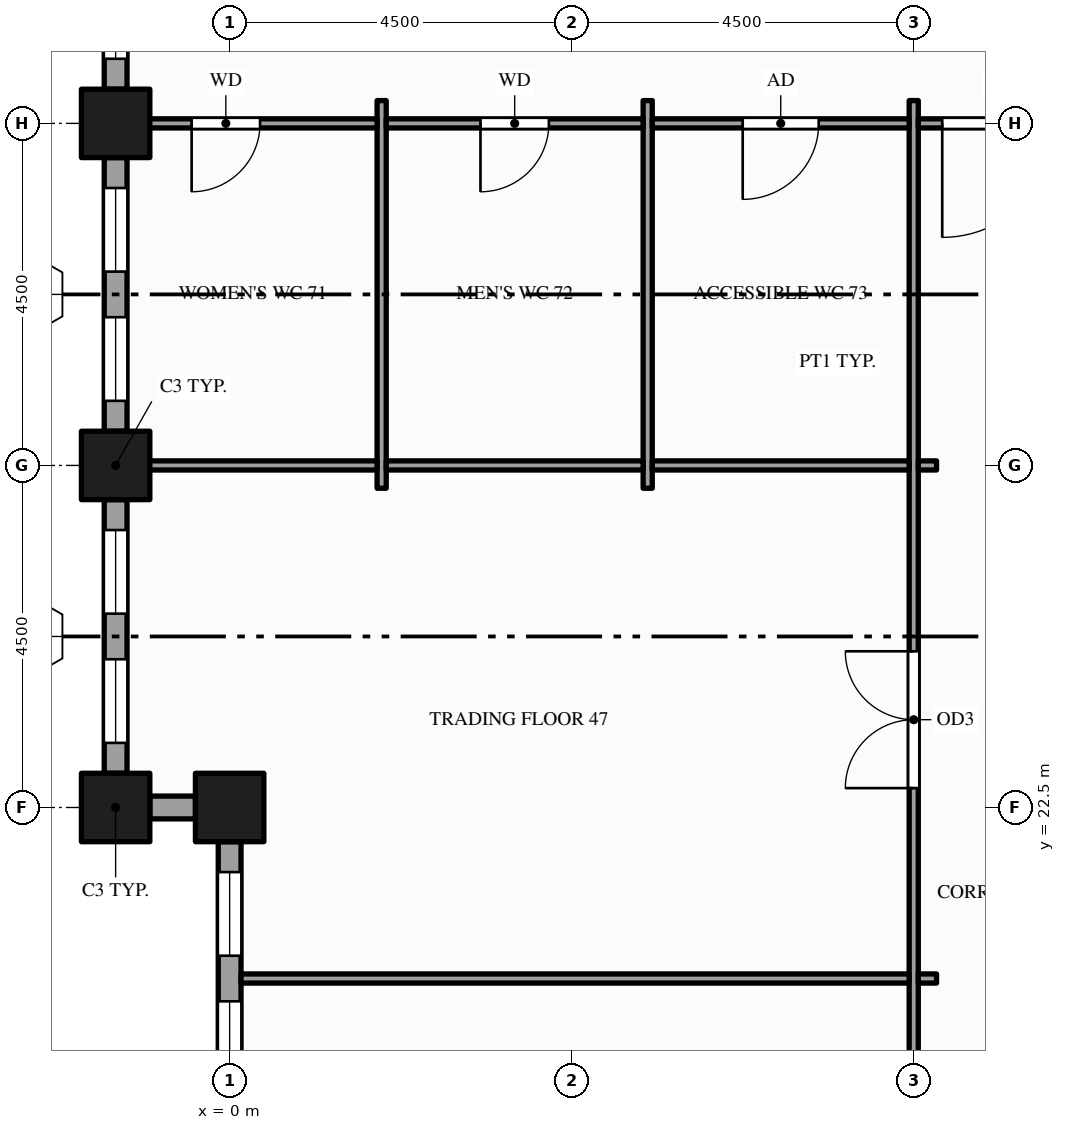
"""IFC4 building model, lengths in metres.
Left out: names, types, materials, properties, quantities, classifications, styles, units other than length and angle.
Written with IfcOpenShell. Run it as: python <this file> out.ifc"""

import sys

from ifc_helpers import new_model, si_unit, direction, frame, frame_2d, origin, origin_2d, place, context, subcontext, project, spatial, rectangle, hollow_rectangle, extrude, element, fill, save


model = new_model("IFC4")
c1 = context("Model", 3, precision=1e-05, world=origin(), true_north=direction((0.0, 1.0)))
c2 = subcontext(c1, "Body", "Model", "MODEL_VIEW")
j1 = project(units=[si_unit("LENGTHUNIT", "METRE"), si_unit("PLANEANGLEUNIT", "RADIAN")], contexts=[c1])
p1 = place(None, origin())
s1 = spatial("IfcSite", under=j1, at=p1, CompositionType="ELEMENT")
p2 = place(p1, origin())
s2 = spatial("IfcBuilding", under=s1, at=p2, CompositionType="ELEMENT")
p3 = place(p2, frame((0.0, 0.0, 159.0)))
s3 = spatial("IfcBuildingStorey", under=s2, at=p3, CompositionType="ELEMENT", Elevation=159.0)
for number, where, z_axis, x_axis in (
    (1, (-1.5, 22.5, -0.15), (0.0, 0.0, 1.0), (1.0, 0.0, 0.0)),
    (2, (-1.5, 27.0, -0.15), (0.0, 0.0, 1.0), (1.0, 0.0, 0.0)),
    (3, (-1.5, 31.5, -0.15), (0.0, 0.0, 1.0), (1.0, 0.0, 0.0)),
    (4, (0.0, 22.5, -0.15), (0.0, 0.0, 1.0), (1.0, 0.0, 0.0)),
):
    element("IfcColumn", number, at=place(p3, frame(where, z_axis=z_axis, x_axis=x_axis)), inside=s3, PredefinedType="COLUMN", context=c2, shape_type="SweptSolid", body=[
        extrude(hollow_rectangle(XDim=0.9, YDim=0.9, WallThickness=0.045, at=origin_2d()), origin(), (0.0, 0.0, 1.0), 4.0),
    ])
p4 = place(p3, frame((-1.5, 35.55, 0.0), z_axis=(0.0, 0.0, 1.0), x_axis=(0.0, -1.0, 0.0)))
e5 = element("IfcWall", 5, at=p4, inside=s3, PredefinedType="STANDARD", context=c2, shape_type="SweptSolid", body=[
    extrude(rectangle(XDim=3.6, YDim=0.3, at=frame_2d((1.8, 0.0))), origin(), (0.0, 0.0, 1.0), 3.149),
])
p5 = place(p4, frame((0.4, 0.0, 0.9)))
e6 = element("IfcOpeningElement", 6, at=p5, cuts=e5, PredefinedType="OPENING", context=c2, shape_type="SweptSolid", body=[
    extrude(rectangle(XDim=1.1, YDim=2.0, at=frame_2d((0.55, 1.0))), frame((0.0, 0.16, 0.0), z_axis=(0.0, -1.0, 0.0), x_axis=(1.0, 0.0, 0.0)), (0.0, 0.0, 1.0), 0.32),
])
p6 = place(p4, frame((2.1, 0.0, 0.9)))
e7 = element("IfcOpeningElement", 7, at=p6, cuts=e5, PredefinedType="OPENING", context=c2, shape_type="SweptSolid", body=[
    extrude(rectangle(XDim=1.1, YDim=2.0, at=frame_2d((0.55, 1.0))), frame((0.0, 0.16, 0.0), z_axis=(0.0, -1.0, 0.0), x_axis=(1.0, 0.0, 0.0)), (0.0, 0.0, 1.0), 0.32),
])
p7 = place(p3, frame((-1.5, 31.05, 0.0), z_axis=(0.0, 0.0, 1.0), x_axis=(0.0, -1.0, 0.0)))
e8 = element("IfcWall", 8, at=p7, inside=s3, PredefinedType="STANDARD", context=c2, shape_type="SweptSolid", body=[
    extrude(rectangle(XDim=3.6, YDim=0.3, at=frame_2d((1.8, 0.0))), origin(), (0.0, 0.0, 1.0), 3.149),
])
p8 = place(p7, frame((0.4, 0.0, 0.9)))
e9 = element("IfcOpeningElement", 9, at=p8, cuts=e8, PredefinedType="OPENING", context=c2, shape_type="SweptSolid", body=[
    extrude(rectangle(XDim=1.1, YDim=2.0, at=frame_2d((0.55, 1.0))), frame((0.0, 0.16, 0.0), z_axis=(0.0, -1.0, 0.0), x_axis=(1.0, 0.0, 0.0)), (0.0, 0.0, 1.0), 0.32),
])
p9 = place(p7, frame((2.1, 0.0, 0.9)))
e10 = element("IfcOpeningElement", 10, at=p9, cuts=e8, PredefinedType="OPENING", context=c2, shape_type="SweptSolid", body=[
    extrude(rectangle(XDim=1.1, YDim=2.0, at=frame_2d((0.55, 1.0))), frame((0.0, 0.16, 0.0), z_axis=(0.0, -1.0, 0.0), x_axis=(1.0, 0.0, 0.0)), (0.0, 0.0, 1.0), 0.32),
])
p10 = place(p3, frame((-1.5, 26.55, 0.0), z_axis=(0.0, 0.0, 1.0), x_axis=(0.0, -1.0, 0.0)))
e11 = element("IfcWall", 11, at=p10, inside=s3, PredefinedType="STANDARD", context=c2, shape_type="SweptSolid", body=[
    extrude(rectangle(XDim=3.6, YDim=0.3, at=frame_2d((1.8, 0.0))), origin(), (0.0, 0.0, 1.0), 3.149),
])
p11 = place(p10, frame((0.4, 0.0, 0.9)))
e12 = element("IfcOpeningElement", 12, at=p11, cuts=e11, PredefinedType="OPENING", context=c2, shape_type="SweptSolid", body=[
    extrude(rectangle(XDim=1.1, YDim=2.0, at=frame_2d((0.55, 1.0))), frame((0.0, 0.16, 0.0), z_axis=(0.0, -1.0, 0.0), x_axis=(1.0, 0.0, 0.0)), (0.0, 0.0, 1.0), 0.32),
])
p12 = place(p10, frame((2.1, 0.0, 0.9)))
e13 = element("IfcOpeningElement", 13, at=p12, cuts=e11, PredefinedType="OPENING", context=c2, shape_type="SweptSolid", body=[
    extrude(rectangle(XDim=1.1, YDim=2.0, at=frame_2d((0.55, 1.0))), frame((0.0, 0.16, 0.0), z_axis=(0.0, -1.0, 0.0), x_axis=(1.0, 0.0, 0.0)), (0.0, 0.0, 1.0), 0.32),
])
p13 = place(p3, frame((-1.05, 22.5, 0.0), z_axis=(0.0, 0.0, 1.0), x_axis=(1.0, 0.0, 0.0)))
e14 = element("IfcWall", 14, at=p13, inside=s3, PredefinedType="STANDARD", context=c2, shape_type="SweptSolid", body=[
    extrude(rectangle(XDim=0.6, YDim=0.3, at=frame_2d((0.3, 0.0))), origin(), (0.0, 0.0, 1.0), 3.149),
])
p14 = place(p3, frame((0.0, 22.05, 0.0), z_axis=(0.0, 0.0, 1.0), x_axis=(0.0, -1.0, 0.0)))
e15 = element("IfcWall", 15, at=p14, inside=s3, PredefinedType="STANDARD", context=c2, shape_type="SweptSolid", body=[
    extrude(rectangle(XDim=3.6, YDim=0.3, at=frame_2d((1.8, 0.0))), origin(), (0.0, 0.0, 1.0), 3.149),
])
p15 = place(p14, frame((0.4, 0.0, 0.9)))
e16 = element("IfcOpeningElement", 16, at=p15, cuts=e15, PredefinedType="OPENING", context=c2, shape_type="SweptSolid", body=[
    extrude(rectangle(XDim=1.1, YDim=2.0, at=frame_2d((0.55, 1.0))), frame((0.0, 0.16, 0.0), z_axis=(0.0, -1.0, 0.0), x_axis=(1.0, 0.0, 0.0)), (0.0, 0.0, 1.0), 0.32),
])
p16 = place(p14, frame((2.1, 0.0, 0.9)))
e17 = element("IfcOpeningElement", 17, at=p16, cuts=e15, PredefinedType="OPENING", context=c2, shape_type="SweptSolid", body=[
    extrude(rectangle(XDim=1.1, YDim=2.0, at=frame_2d((0.55, 1.0))), frame((0.0, 0.16, 0.0), z_axis=(0.0, -1.0, 0.0), x_axis=(1.0, 0.0, 0.0)), (0.0, 0.0, 1.0), 0.32),
])
for number, where, z_axis, x_axis in (
    (18, (2.0, 26.7, 0.0), (0.0, 0.0, 1.0), (0.0, 1.0, 0.0)),
    (19, (5.5, 26.7, 0.0), (0.0, 0.0, 1.0), (0.0, 1.0, 0.0)),
):
    element("IfcWall", number, at=place(p3, frame(where, z_axis=z_axis, x_axis=x_axis)), inside=s3, PredefinedType="PARTITIONING", context=c2, shape_type="SweptSolid", body=[
        extrude(rectangle(XDim=5.1, YDim=0.12, at=frame_2d((2.55, 0.0))), origin(), (0.0, 0.0, 1.0), 3.85),
    ])
p17 = place(p3, frame((9.0, 10.95, 0.0), z_axis=(0.0, 0.0, 1.0), x_axis=(0.0, 1.0, 0.0)))
e20 = element("IfcWall", 20, at=p17, inside=s3, PredefinedType="PARTITIONING", context=c2, shape_type="SweptSolid", body=[
    extrude(rectangle(XDim=20.85, YDim=0.12, at=frame_2d((10.425, 0.0))), origin(), (0.0, 0.0, 1.0), 2.6),
])
p18 = place(p17, frame((2.05, 0.0, 0.0)))
e21 = element("IfcOpeningElement", 21, at=p18, cuts=e20, PredefinedType="OPENING", context=c2, shape_type="SweptSolid", body=[
    extrude(rectangle(XDim=1.0, YDim=2.1, at=frame_2d((0.5, 1.05))), frame((0.0, 0.07, 0.0), z_axis=(0.0, -1.0, 0.0), x_axis=(1.0, 0.0, 0.0)), (0.0, 0.0, 1.0), 0.14),
])
p19 = place(p17, frame((6.55, 0.0, 0.0)))
e22 = element("IfcOpeningElement", 22, at=p19, cuts=e20, PredefinedType="OPENING", context=c2, shape_type="SweptSolid", body=[
    extrude(rectangle(XDim=1.0, YDim=2.1, at=frame_2d((0.5, 1.05))), frame((0.0, 0.07, 0.0), z_axis=(0.0, -1.0, 0.0), x_axis=(1.0, 0.0, 0.0)), (0.0, 0.0, 1.0), 0.14),
])
p20 = place(p17, frame((11.805, 0.0, 0.0)))
e23 = element("IfcOpeningElement", 23, at=p20, cuts=e20, PredefinedType="OPENING", context=c2, shape_type="SweptSolid", body=[
    extrude(rectangle(XDim=1.8, YDim=2.1, at=frame_2d((0.9, 1.05))), frame((0.0, 0.07, 0.0), z_axis=(0.0, -1.0, 0.0), x_axis=(1.0, 0.0, 0.0)), (0.0, 0.0, 1.0), 0.14),
])
p21 = place(p3, frame((0.15, 20.25, 0.0), z_axis=(0.0, 0.0, 1.0), x_axis=(1.0, 0.0, 0.0)))
e24 = element("IfcWall", 24, at=p21, inside=s3, PredefinedType="PARTITIONING", context=c2, shape_type="SweptSolid", body=[
    extrude(rectangle(XDim=8.79, YDim=0.12, at=frame_2d((4.395, 0.0))), origin(), (0.0, 0.0, 1.0), 2.87),
])
p22 = place(p3, frame((9.06, 20.25, 0.0), z_axis=(0.0, 0.0, 1.0), x_axis=(1.0, 0.0, 0.0)))
e25 = element("IfcWall", 25, at=p22, inside=s3, PredefinedType="PARTITIONING", context=c2, shape_type="SweptSolid", body=[
    extrude(rectangle(XDim=0.24, YDim=0.12, at=frame_2d((0.12, 0.0))), origin(), (0.0, 0.0, 1.0), 2.87),
])
p23 = place(p3, frame((-1.35, 27.0, 0.0), z_axis=(0.0, 0.0, 1.0), x_axis=(1.0, 0.0, 0.0)))
e26 = element("IfcWall", 26, at=p23, inside=s3, PredefinedType="PARTITIONING", context=c2, shape_type="SweptSolid", body=[
    extrude(rectangle(XDim=3.29, YDim=0.12, at=frame_2d((1.645, 0.0))), origin(), (0.0, 0.0, 1.0), 2.87),
])
for number, where, z_axis, x_axis in (
    (27, (2.06, 27.0, 0.0), (0.0, 0.0, 1.0), (1.0, 0.0, 0.0)),
    (28, (5.56, 27.0, 0.0), (0.0, 0.0, 1.0), (1.0, 0.0, 0.0)),
):
    element("IfcWall", number, at=place(p3, frame(where, z_axis=z_axis, x_axis=x_axis)), inside=s3, PredefinedType="PARTITIONING", context=c2, shape_type="SweptSolid", body=[
        extrude(rectangle(XDim=3.38, YDim=0.12, at=frame_2d((1.69, 0.0))), origin(), (0.0, 0.0, 1.0), 2.87),
    ])
p24 = place(p3, frame((9.06, 27.0, 0.0), z_axis=(0.0, 0.0, 1.0), x_axis=(1.0, 0.0, 0.0)))
e29 = element("IfcWall", 29, at=p24, inside=s3, PredefinedType="PARTITIONING", context=c2, shape_type="SweptSolid", body=[
    extrude(rectangle(XDim=0.24, YDim=0.12, at=frame_2d((0.12, 0.0))), origin(), (0.0, 0.0, 1.0), 2.87),
])
p25 = place(p3, frame((-1.35, 31.5, 0.0), z_axis=(0.0, 0.0, 1.0), x_axis=(1.0, 0.0, 0.0)))
e30 = element("IfcWall", 30, at=p25, inside=s3, PredefinedType="PARTITIONING", context=c2, shape_type="SweptSolid", body=[
    extrude(rectangle(XDim=3.29, YDim=0.12, at=frame_2d((1.645, 0.0))), origin(), (0.0, 0.0, 1.0), 2.87),
])
p26 = place(p25, frame((0.85, 0.0, 0.0)))
e31 = element("IfcOpeningElement", 31, at=p26, cuts=e30, PredefinedType="OPENING", context=c2, shape_type="SweptSolid", body=[
    extrude(rectangle(XDim=0.9, YDim=2.1, at=frame_2d((0.45, 1.05))), frame((0.0, 0.07, 0.0), z_axis=(0.0, -1.0, 0.0), x_axis=(1.0, 0.0, 0.0)), (0.0, 0.0, 1.0), 0.14),
])
p27 = place(p3, frame((2.06, 31.5, 0.0), z_axis=(0.0, 0.0, 1.0), x_axis=(1.0, 0.0, 0.0)))
e32 = element("IfcWall", 32, at=p27, inside=s3, PredefinedType="PARTITIONING", context=c2, shape_type="SweptSolid", body=[
    extrude(rectangle(XDim=3.38, YDim=0.12, at=frame_2d((1.69, 0.0))), origin(), (0.0, 0.0, 1.0), 2.87),
])
p28 = place(p27, frame((1.24, 0.0, 0.0)))
e33 = element("IfcOpeningElement", 33, at=p28, cuts=e32, PredefinedType="OPENING", context=c2, shape_type="SweptSolid", body=[
    extrude(rectangle(XDim=0.9, YDim=2.1, at=frame_2d((0.45, 1.05))), frame((0.0, 0.07, 0.0), z_axis=(0.0, -1.0, 0.0), x_axis=(1.0, 0.0, 0.0)), (0.0, 0.0, 1.0), 0.14),
])
p29 = place(p3, frame((5.56, 31.5, 0.0), z_axis=(0.0, 0.0, 1.0), x_axis=(1.0, 0.0, 0.0)))
e34 = element("IfcWall", 34, at=p29, inside=s3, PredefinedType="PARTITIONING", context=c2, shape_type="SweptSolid", body=[
    extrude(rectangle(XDim=3.38, YDim=0.12, at=frame_2d((1.69, 0.0))), origin(), (0.0, 0.0, 1.0), 2.87),
])
p30 = place(p29, frame((1.19, 0.0, 0.0)))
e35 = element("IfcOpeningElement", 35, at=p30, cuts=e34, PredefinedType="OPENING", context=c2, shape_type="SweptSolid", body=[
    extrude(rectangle(XDim=1.0, YDim=2.1, at=frame_2d((0.5, 1.05))), frame((0.0, 0.07, 0.0), z_axis=(0.0, -1.0, 0.0), x_axis=(1.0, 0.0, 0.0)), (0.0, 0.0, 1.0), 0.14),
])
p31 = place(p3, frame((9.06, 31.5, 0.0), z_axis=(0.0, 0.0, 1.0), x_axis=(1.0, 0.0, 0.0)))
e36 = element("IfcWall", 36, at=p31, inside=s3, PredefinedType="PARTITIONING", context=c2, shape_type="SweptSolid", body=[
    extrude(rectangle(XDim=2.13, YDim=0.12, at=frame_2d((1.065, 0.0))), origin(), (0.0, 0.0, 1.0), 2.87),
])
p32 = place(p31, frame((0.315, 0.0, 0.0)))
e37 = element("IfcOpeningElement", 37, at=p32, cuts=e36, PredefinedType="OPENING", context=c2, shape_type="SweptSolid", body=[
    extrude(rectangle(XDim=1.5, YDim=2.1, at=frame_2d((0.75, 1.05))), frame((0.0, 0.07, 0.0), z_axis=(0.0, -1.0, 0.0), x_axis=(1.0, 0.0, 0.0)), (0.0, 0.0, 1.0), 0.14),
])
p33 = place(p6, origin())
e38 = element("IfcWindow", 38, at=p33, inside=s3, PartitioningType="SINGLE_PANEL", PredefinedType="WINDOW", context=c2, shape_type="SweptSolid", body=[
    extrude(rectangle(XDim=1.1, YDim=2.0, at=frame_2d((0.55, 1.0))), frame((0.0, 0.03, 0.0), z_axis=(0.0, -1.0, 0.0), x_axis=(1.0, 0.0, 0.0)), (0.0, 0.0, 1.0), 0.06),
])
fill(e7, e38)
p34 = place(p8, origin())
e39 = element("IfcWindow", 39, at=p34, inside=s3, PartitioningType="SINGLE_PANEL", PredefinedType="WINDOW", context=c2, shape_type="SweptSolid", body=[
    extrude(rectangle(XDim=1.1, YDim=2.0, at=frame_2d((0.55, 1.0))), frame((0.0, 0.03, 0.0), z_axis=(0.0, -1.0, 0.0), x_axis=(1.0, 0.0, 0.0)), (0.0, 0.0, 1.0), 0.06),
])
fill(e9, e39)
p35 = place(p9, origin())
e40 = element("IfcWindow", 40, at=p35, inside=s3, PartitioningType="SINGLE_PANEL", PredefinedType="WINDOW", context=c2, shape_type="SweptSolid", body=[
    extrude(rectangle(XDim=1.1, YDim=2.0, at=frame_2d((0.55, 1.0))), frame((0.0, 0.03, 0.0), z_axis=(0.0, -1.0, 0.0), x_axis=(1.0, 0.0, 0.0)), (0.0, 0.0, 1.0), 0.06),
])
fill(e10, e40)
p36 = place(p11, origin())
e41 = element("IfcWindow", 41, at=p36, inside=s3, PartitioningType="SINGLE_PANEL", PredefinedType="WINDOW", context=c2, shape_type="SweptSolid", body=[
    extrude(rectangle(XDim=1.1, YDim=2.0, at=frame_2d((0.55, 1.0))), frame((0.0, 0.03, 0.0), z_axis=(0.0, -1.0, 0.0), x_axis=(1.0, 0.0, 0.0)), (0.0, 0.0, 1.0), 0.06),
])
fill(e12, e41)
p37 = place(p12, origin())
e42 = element("IfcWindow", 42, at=p37, inside=s3, PartitioningType="SINGLE_PANEL", PredefinedType="WINDOW", context=c2, shape_type="SweptSolid", body=[
    extrude(rectangle(XDim=1.1, YDim=2.0, at=frame_2d((0.55, 1.0))), frame((0.0, 0.03, 0.0), z_axis=(0.0, -1.0, 0.0), x_axis=(1.0, 0.0, 0.0)), (0.0, 0.0, 1.0), 0.06),
])
fill(e13, e42)
p38 = place(p15, origin())
e43 = element("IfcWindow", 43, at=p38, inside=s3, PartitioningType="SINGLE_PANEL", PredefinedType="WINDOW", context=c2, shape_type="SweptSolid", body=[
    extrude(rectangle(XDim=1.1, YDim=2.0, at=frame_2d((0.55, 1.0))), frame((0.0, 0.03, 0.0), z_axis=(0.0, -1.0, 0.0), x_axis=(1.0, 0.0, 0.0)), (0.0, 0.0, 1.0), 0.06),
])
fill(e16, e43)
p39 = place(p16, origin())
e44 = element("IfcWindow", 44, at=p39, inside=s3, PartitioningType="SINGLE_PANEL", PredefinedType="WINDOW", context=c2, shape_type="SweptSolid", body=[
    extrude(rectangle(XDim=1.1, YDim=2.0, at=frame_2d((0.55, 1.0))), frame((0.0, 0.03, 0.0), z_axis=(0.0, -1.0, 0.0), x_axis=(1.0, 0.0, 0.0)), (0.0, 0.0, 1.0), 0.06),
])
fill(e17, e44)
p40 = place(p32, origin())
e45 = element("IfcDoor", 45, at=p40, inside=s3, OperationType="SINGLE_SWING_LEFT", PredefinedType="DOOR", context=c2, shape_type="SweptSolid", body=[
    extrude(rectangle(XDim=1.5, YDim=2.1, at=frame_2d((0.75, 1.05))), frame((0.0, 0.025, 0.0), z_axis=(0.0, -1.0, 0.0), x_axis=(1.0, 0.0, 0.0)), (0.0, 0.0, 1.0), 0.05),
])
fill(e37, e45)
p41 = place(p20, origin())
e46 = element("IfcDoor", 46, at=p41, inside=s3, OperationType="DOUBLE_DOOR_SINGLE_SWING", PredefinedType="DOOR", context=c2, shape_type="SweptSolid", body=[
    extrude(rectangle(XDim=1.8, YDim=2.1, at=frame_2d((0.9, 1.05))), frame((0.0, 0.025, 0.0), z_axis=(0.0, -1.0, 0.0), x_axis=(1.0, 0.0, 0.0)), (0.0, 0.0, 1.0), 0.05),
])
fill(e23, e46)
p42 = place(p26, origin())
e47 = element("IfcDoor", 47, at=p42, inside=s3, OperationType="SINGLE_SWING_LEFT", PredefinedType="DOOR", context=c2, shape_type="SweptSolid", body=[
    extrude(rectangle(XDim=0.9, YDim=2.1, at=frame_2d((0.45, 1.05))), frame((0.0, 0.025, 0.0), z_axis=(0.0, -1.0, 0.0), x_axis=(1.0, 0.0, 0.0)), (0.0, 0.0, 1.0), 0.05),
])
fill(e31, e47)
p43 = place(p28, origin())
e48 = element("IfcDoor", 48, at=p43, inside=s3, OperationType="SINGLE_SWING_LEFT", PredefinedType="DOOR", context=c2, shape_type="SweptSolid", body=[
    extrude(rectangle(XDim=0.9, YDim=2.1, at=frame_2d((0.45, 1.05))), frame((0.0, 0.025, 0.0), z_axis=(0.0, -1.0, 0.0), x_axis=(1.0, 0.0, 0.0)), (0.0, 0.0, 1.0), 0.05),
])
fill(e33, e48)
p44 = place(p30, origin())
e49 = element("IfcDoor", 49, at=p44, inside=s3, OperationType="SINGLE_SWING_LEFT", PredefinedType="DOOR", context=c2, shape_type="SweptSolid", body=[
    extrude(rectangle(XDim=1.0, YDim=2.1, at=frame_2d((0.5, 1.05))), frame((0.0, 0.025, 0.0), z_axis=(0.0, -1.0, 0.0), x_axis=(1.0, 0.0, 0.0)), (0.0, 0.0, 1.0), 0.05),
])
fill(e35, e49)
save(model, sys.argv[1])
